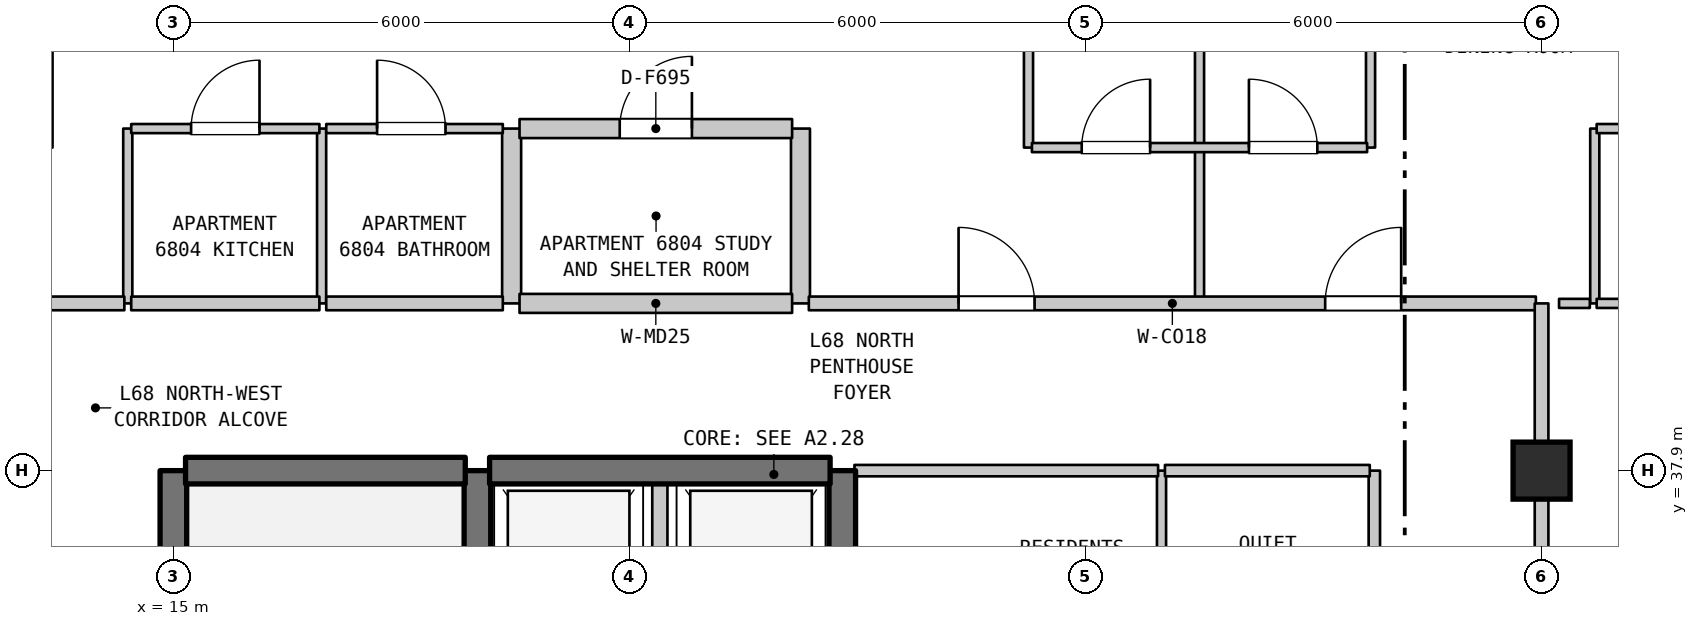
"""IFC4 building model, lengths in metres.
Left out: names, types, materials, properties, quantities, classifications, styles, units other than length and angle.
Written with IfcOpenShell. Run it as: python <this file> out.ifc"""

import sys

from ifc_helpers import new_model, si_unit, direction, frame, frame_2d, origin, origin_2d, place, context, subcontext, project, spatial, rectangle, extrude, element, fill, save


model = new_model("IFC4")
c1 = context("Model", 3, precision=1e-05, world=origin(), true_north=direction((0.0, 1.0)))
c2 = subcontext(c1, "Body", "Model", "MODEL_VIEW")
j1 = project(units=[si_unit("LENGTHUNIT", "METRE"), si_unit("PLANEANGLEUNIT", "RADIAN")], contexts=[c1])
p1 = place(None, origin())
s1 = spatial("IfcSite", under=j1, at=p1, CompositionType="ELEMENT")
p2 = place(p1, origin())
s2 = spatial("IfcBuilding", under=s1, at=p2, CompositionType="ELEMENT")
p3 = place(p2, frame((0.0, 0.0, 273.2)))
s3 = spatial("IfcBuildingStorey", under=s2, at=p3, CompositionType="ELEMENT", Elevation=273.2)
p4 = place(p3, frame((33.0, 37.9, 0.0), z_axis=(0.0, 0.0, 1.0), x_axis=(1.0, 0.0, 0.0)))
e1 = element("IfcColumn", 1, at=p4, inside=s3, PredefinedType="COLUMN", context=c2, shape_type="SweptSolid", body=[
    extrude(rectangle(XDim=0.75, YDim=0.75, at=origin_2d()), origin(), (0.0, 0.0, 1.0), 3.7),
])
p5 = place(p3, frame((13.35, 42.15, 0.0), z_axis=(0.0, 0.0, 1.0), x_axis=(0.0, 1.0, 0.0)))
e2 = element("IfcWall", 2, at=p5, inside=s3, PredefinedType="PARTITIONING", context=c2, shape_type="SweptSolid", body=[
    extrude(rectangle(XDim=7.45, YDim=0.12, at=frame_2d((3.725, 0.0))), origin(), (0.0, 0.0, 1.0), 3.39),
])
p6 = place(p3, frame((14.4, 40.1, 0.0), z_axis=(0.0, 0.0, 1.0), x_axis=(0.0, 1.0, 0.0)))
e3 = element("IfcWall", 3, at=p6, inside=s3, PredefinedType="PARTITIONING", context=c2, shape_type="SweptSolid", body=[
    extrude(rectangle(XDim=2.3, YDim=0.12, at=frame_2d((1.15, 0.0))), origin(), (0.0, 0.0, 1.0), 3.39),
])
p7 = place(p3, frame((15.0, 31.1, 0.0), z_axis=(0.0, 0.0, 1.0), x_axis=(0.0, 1.0, 0.0)))
e4 = element("IfcWall", 4, at=p7, inside=s3, PredefinedType="SHEAR", context=c2, shape_type="SweptSolid", body=[
    extrude(rectangle(XDim=6.8, YDim=0.35, at=frame_2d((3.4, 0.0))), origin(), (0.0, 0.0, 1.0), 3.39),
])
p8 = place(p3, frame((16.95, 40.1, 0.0), z_axis=(0.0, 0.0, 1.0), x_axis=(0.0, 1.0, 0.0)))
e5 = element("IfcWall", 5, at=p8, inside=s3, PredefinedType="PARTITIONING", context=c2, shape_type="SweptSolid", body=[
    extrude(rectangle(XDim=2.3, YDim=0.12, at=frame_2d((1.15, 0.0))), origin(), (0.0, 0.0, 1.0), 3.39),
])
p9 = place(p3, frame((19.0, 35.0, 0.0), z_axis=(0.0, 0.0, 1.0), x_axis=(0.0, 1.0, 0.0)))
e6 = element("IfcWall", 6, at=p9, inside=s3, PredefinedType="SHEAR", context=c2, shape_type="SweptSolid", body=[
    extrude(rectangle(XDim=2.9, YDim=0.35, at=frame_2d((1.45, 0.0))), origin(), (0.0, 0.0, 1.0), 3.39),
])
p10 = place(p3, frame((19.45, 40.1, 0.0), z_axis=(0.0, 0.0, 1.0), x_axis=(0.0, 1.0, 0.0)))
e7 = element("IfcWall", 7, at=p10, inside=s3, PredefinedType="STANDARD", context=c2, shape_type="SweptSolid", body=[
    extrude(rectangle(XDim=2.3, YDim=0.25, at=frame_2d((1.15, 0.0))), origin(), (0.0, 0.0, 1.0), 3.39),
])
p11 = place(p3, frame((21.4, 35.0, 0.0), z_axis=(0.0, 0.0, 1.0), x_axis=(0.0, 1.0, 0.0)))
e8 = element("IfcWall", 8, at=p11, inside=s3, PredefinedType="STANDARD", context=c2, shape_type="SweptSolid", body=[
    extrude(rectangle(XDim=2.9, YDim=0.2, at=frame_2d((1.45, 0.0))), origin(), (0.0, 0.0, 1.0), 3.39),
])
p12 = place(p3, frame((23.25, 40.1, 0.0), z_axis=(0.0, 0.0, 1.0), x_axis=(0.0, 1.0, 0.0)))
e9 = element("IfcWall", 9, at=p12, inside=s3, PredefinedType="STANDARD", context=c2, shape_type="SweptSolid", body=[
    extrude(rectangle(XDim=2.3, YDim=0.25, at=frame_2d((1.15, 0.0))), origin(), (0.0, 0.0, 1.0), 3.39),
])
p13 = place(p3, frame((23.8, 35.0, 0.0), z_axis=(0.0, 0.0, 1.0), x_axis=(0.0, 1.0, 0.0)))
e10 = element("IfcWall", 10, at=p13, inside=s3, PredefinedType="SHEAR", context=c2, shape_type="SweptSolid", body=[
    extrude(rectangle(XDim=2.9, YDim=0.35, at=frame_2d((1.45, 0.0))), origin(), (0.0, 0.0, 1.0), 3.39),
])
p14 = place(p3, frame((26.25, 42.15, 0.0), z_axis=(0.0, 0.0, 1.0), x_axis=(0.0, 1.0, 0.0)))
e11 = element("IfcWall", 11, at=p14, inside=s3, PredefinedType="PARTITIONING", context=c2, shape_type="SweptSolid", body=[
    extrude(rectangle(XDim=11.74, YDim=0.12, at=frame_2d((5.87, 0.0))), origin(), (0.0, 0.0, 1.0), 3.39),
])
p15 = place(p3, frame((28.0, 35.0, 0.0), z_axis=(0.0, 0.0, 1.0), x_axis=(0.0, 1.0, 0.0)))
e12 = element("IfcWall", 12, at=p15, inside=s3, PredefinedType="PARTITIONING", context=c2, shape_type="SweptSolid", body=[
    extrude(rectangle(XDim=2.9, YDim=0.12, at=frame_2d((1.45, 0.0))), origin(), (0.0, 0.0, 1.0), 3.39),
])
p16 = place(p3, frame((28.5, 40.1, 0.0), z_axis=(0.0, 0.0, 1.0), x_axis=(0.0, 1.0, 0.0)))
e13 = element("IfcWall", 13, at=p16, inside=s3, PredefinedType="PARTITIONING", context=c2, shape_type="SweptSolid", body=[
    extrude(rectangle(XDim=2.05, YDim=0.12, at=frame_2d((1.025, 0.0))), origin(), (0.0, 0.0, 1.0), 3.39),
])
for number, where, z_axis, x_axis in (
    (14, (28.5, 42.15, 0.0), (0.0, 0.0, 1.0), (0.0, 1.0, 0.0)),
    (15, (30.75, 42.15, 0.0), (0.0, 0.0, 1.0), (0.0, 1.0, 0.0)),
):
    element("IfcWall", number, at=place(p3, frame(where, z_axis=z_axis, x_axis=x_axis)), inside=s3, PredefinedType="PARTITIONING", context=c2, shape_type="SweptSolid", body=[
        extrude(rectangle(XDim=11.74, YDim=0.12, at=frame_2d((5.87, 0.0))), origin(), (0.0, 0.0, 1.0), 3.39),
    ])
p17 = place(p3, frame((30.8, 35.0, 0.0), z_axis=(0.0, 0.0, 1.0), x_axis=(0.0, 1.0, 0.0)))
e16 = element("IfcWall", 16, at=p17, inside=s3, PredefinedType="STANDARD", context=c2, shape_type="SweptSolid", body=[
    extrude(rectangle(XDim=2.9, YDim=0.15, at=frame_2d((1.45, 0.0))), origin(), (0.0, 0.0, 1.0), 3.39),
])
p18 = place(p3, frame((33.0, 33.75, 0.0), z_axis=(0.0, 0.0, 1.0), x_axis=(0.0, 1.0, 0.0)))
e17 = element("IfcWall", 17, at=p18, inside=s3, PredefinedType="STANDARD", context=c2, shape_type="SweptSolid", body=[
    extrude(rectangle(XDim=4.15, YDim=0.18, at=frame_2d((2.075, 0.0))), origin(), (0.0, 0.0, 1.0), 2.89),
])
p19 = place(p3, frame((33.7, 40.1, 0.0), z_axis=(0.0, 0.0, 1.0), x_axis=(0.0, 1.0, 0.0)))
e18 = element("IfcWall", 18, at=p19, inside=s3, PredefinedType="PARTITIONING", context=c2, shape_type="SweptSolid", body=[
    extrude(rectangle(XDim=2.3, YDim=0.12, at=frame_2d((1.15, 0.0))), origin(), (0.0, 0.0, 1.0), 3.39),
])
p20 = place(p3, frame((15.16, 37.9, 0.0), z_axis=(0.0, 0.0, 1.0), x_axis=(1.0, 0.0, 0.0)))
e19 = element("IfcWall", 19, at=p20, inside=s3, PredefinedType="SHEAR", context=c2, shape_type="SweptSolid", body=[
    extrude(rectangle(XDim=3.68, YDim=0.35, at=frame_2d((1.84, 0.0))), origin(), (0.0, 0.0, 1.0), 3.39),
])
p21 = place(p3, frame((19.16, 37.9, 0.0), z_axis=(0.0, 0.0, 1.0), x_axis=(1.0, 0.0, 0.0)))
e20 = element("IfcWall", 20, at=p21, inside=s3, PredefinedType="SHEAR", context=c2, shape_type="SweptSolid", body=[
    extrude(rectangle(XDim=4.48, YDim=0.35, at=frame_2d((2.24, 0.0))), origin(), (0.0, 0.0, 1.0), 3.39),
])
p22 = place(p3, frame((23.96, 37.9, 0.0), z_axis=(0.0, 0.0, 1.0), x_axis=(1.0, 0.0, 0.0)))
e21 = element("IfcWall", 21, at=p22, inside=s3, PredefinedType="STANDARD", context=c2, shape_type="SweptSolid", body=[
    extrude(rectangle(XDim=3.995, YDim=0.15, at=frame_2d((1.998, 0.0))), origin(), (0.0, 0.0, 1.0), 2.89),
])
p23 = place(p3, frame((28.045, 37.9, 0.0), z_axis=(0.0, 0.0, 1.0), x_axis=(1.0, 0.0, 0.0)))
e22 = element("IfcWall", 22, at=p23, inside=s3, PredefinedType="STANDARD", context=c2, shape_type="SweptSolid", body=[
    extrude(rectangle(XDim=2.695, YDim=0.15, at=frame_2d((1.348, 0.0))), origin(), (0.0, 0.0, 1.0), 2.89),
])
p24 = place(p3, frame((12.975, 40.1, 0.0), z_axis=(0.0, 0.0, 1.0), x_axis=(1.0, 0.0, 0.0)))
e23 = element("IfcWall", 23, at=p24, inside=s3, PredefinedType="STANDARD", context=c2, shape_type="SweptSolid", body=[
    extrude(rectangle(XDim=1.38, YDim=0.18, at=frame_2d((0.69, 0.0))), origin(), (0.0, 0.0, 1.0), 3.39),
])
p25 = place(p3, frame((14.445, 40.1, 0.0), z_axis=(0.0, 0.0, 1.0), x_axis=(1.0, 0.0, 0.0)))
e24 = element("IfcWall", 24, at=p25, inside=s3, PredefinedType="STANDARD", context=c2, shape_type="SweptSolid", body=[
    extrude(rectangle(XDim=2.476, YDim=0.18, at=frame_2d((1.238, 0.0))), origin(), (0.0, 0.0, 1.0), 3.39),
])
p26 = place(p3, frame((17.011, 40.1, 0.0), z_axis=(0.0, 0.0, 1.0), x_axis=(1.0, 0.0, 0.0)))
e25 = element("IfcWall", 25, at=p26, inside=s3, PredefinedType="STANDARD", context=c2, shape_type="SweptSolid", body=[
    extrude(rectangle(XDim=2.323, YDim=0.18, at=frame_2d((1.162, 0.0))), origin(), (0.0, 0.0, 1.0), 3.39),
])
p27 = place(p3, frame((19.554, 40.1, 0.0), z_axis=(0.0, 0.0, 1.0), x_axis=(1.0, 0.0, 0.0)))
e26 = element("IfcWall", 26, at=p27, inside=s3, PredefinedType="STANDARD", context=c2, shape_type="SweptSolid", body=[
    extrude(rectangle(XDim=3.586, YDim=0.25, at=frame_2d((1.793, 0.0))), origin(), (0.0, 0.0, 1.0), 3.39),
])
p28 = place(p3, frame((23.36, 40.1, 0.0), z_axis=(0.0, 0.0, 1.0), x_axis=(1.0, 0.0, 0.0)))
e27 = element("IfcWall", 27, at=p28, inside=s3, PredefinedType="STANDARD", context=c2, shape_type="SweptSolid", body=[
    extrude(rectangle(XDim=9.565, YDim=0.18, at=frame_2d((4.782, 0.0))), origin(), (0.0, 0.0, 1.0), 3.39),
])
p29 = place(p28, frame((1.97, 0.0, 0.0)))
e28 = element("IfcOpeningElement", 28, at=p29, cuts=e27, PredefinedType="OPENING", context=c2, shape_type="SweptSolid", body=[
    extrude(rectangle(XDim=1.0, YDim=2.15, at=frame_2d((0.5, 1.075))), frame((0.0, 0.1, 0.0), z_axis=(0.0, -1.0, 0.0), x_axis=(1.0, 0.0, 0.0)), (0.0, 0.0, 1.0), 0.2),
])
p30 = place(p28, frame((6.793, 0.0, 0.0)))
e29 = element("IfcOpeningElement", 29, at=p30, cuts=e27, PredefinedType="OPENING", context=c2, shape_type="SweptSolid", body=[
    extrude(rectangle(XDim=1.0, YDim=2.15, at=frame_2d((0.5, 1.075))), frame((0.0, 0.1, 0.0), z_axis=(0.0, -1.0, 0.0), x_axis=(1.0, 0.0, 0.0)), (0.0, 0.0, 1.0), 0.2),
])
p31 = place(p3, frame((33.23, 40.1, 0.0), z_axis=(0.0, 0.0, 1.0), x_axis=(1.0, 0.0, 0.0)))
e30 = element("IfcWall", 30, at=p31, inside=s3, PredefinedType="PARTITIONING", context=c2, shape_type="SweptSolid", body=[
    extrude(rectangle(XDim=0.405, YDim=0.12, at=frame_2d((0.203, 0.0))), origin(), (0.0, 0.0, 1.0), 3.39),
])
p32 = place(p3, frame((33.725, 40.1, 0.0), z_axis=(0.0, 0.0, 1.0), x_axis=(1.0, 0.0, 0.0)))
e31 = element("IfcWall", 31, at=p32, inside=s3, PredefinedType="PARTITIONING", context=c2, shape_type="SweptSolid", body=[
    extrude(rectangle(XDim=1.685, YDim=0.12, at=frame_2d((0.842, 0.0))), origin(), (0.0, 0.0, 1.0), 3.39),
])
p33 = place(p3, frame((26.295, 42.15, 0.0), z_axis=(0.0, 0.0, 1.0), x_axis=(1.0, 0.0, 0.0)))
e32 = element("IfcWall", 32, at=p33, inside=s3, PredefinedType="PARTITIONING", context=c2, shape_type="SweptSolid", body=[
    extrude(rectangle(XDim=4.41, YDim=0.12, at=frame_2d((2.205, 0.0))), origin(), (0.0, 0.0, 1.0), 3.39),
])
p34 = place(p33, frame((0.655, 0.0, 0.0)))
e33 = element("IfcOpeningElement", 33, at=p34, cuts=e32, PredefinedType="OPENING", context=c2, shape_type="SweptSolid", body=[
    extrude(rectangle(XDim=0.9, YDim=2.15, at=frame_2d((0.45, 1.075))), frame((0.0, 0.07, 0.0), z_axis=(0.0, -1.0, 0.0), x_axis=(1.0, 0.0, 0.0)), (0.0, 0.0, 1.0), 0.14),
])
p35 = place(p33, frame((2.855, 0.0, 0.0)))
e34 = element("IfcOpeningElement", 34, at=p35, cuts=e32, PredefinedType="OPENING", context=c2, shape_type="SweptSolid", body=[
    extrude(rectangle(XDim=0.9, YDim=2.15, at=frame_2d((0.45, 1.075))), frame((0.0, 0.07, 0.0), z_axis=(0.0, -1.0, 0.0), x_axis=(1.0, 0.0, 0.0)), (0.0, 0.0, 1.0), 0.14),
])
p36 = place(p3, frame((14.445, 42.4, 0.0), z_axis=(0.0, 0.0, 1.0), x_axis=(1.0, 0.0, 0.0)))
e35 = element("IfcWall", 35, at=p36, inside=s3, PredefinedType="PARTITIONING", context=c2, shape_type="SweptSolid", body=[
    extrude(rectangle(XDim=2.476, YDim=0.12, at=frame_2d((1.238, 0.0))), origin(), (0.0, 0.0, 1.0), 3.39),
])
p37 = place(p36, frame((0.788, 0.0, 0.0)))
e36 = element("IfcOpeningElement", 36, at=p37, cuts=e35, PredefinedType="OPENING", context=c2, shape_type="SweptSolid", body=[
    extrude(rectangle(XDim=0.9, YDim=2.15, at=frame_2d((0.45, 1.075))), frame((0.0, 0.07, 0.0), z_axis=(0.0, -1.0, 0.0), x_axis=(1.0, 0.0, 0.0)), (0.0, 0.0, 1.0), 0.14),
])
p38 = place(p3, frame((17.011, 42.4, 0.0), z_axis=(0.0, 0.0, 1.0), x_axis=(1.0, 0.0, 0.0)))
e37 = element("IfcWall", 37, at=p38, inside=s3, PredefinedType="PARTITIONING", context=c2, shape_type="SweptSolid", body=[
    extrude(rectangle(XDim=2.323, YDim=0.12, at=frame_2d((1.162, 0.0))), origin(), (0.0, 0.0, 1.0), 3.39),
])
p39 = place(p38, frame((0.669, 0.0, 0.0)))
e38 = element("IfcOpeningElement", 38, at=p39, cuts=e37, PredefinedType="OPENING", context=c2, shape_type="SweptSolid", body=[
    extrude(rectangle(XDim=0.9, YDim=2.1, at=frame_2d((0.45, 1.05))), frame((0.0, 0.07, 0.0), z_axis=(0.0, -1.0, 0.0), x_axis=(1.0, 0.0, 0.0)), (0.0, 0.0, 1.0), 0.14),
])
p40 = place(p3, frame((19.554, 42.4, 0.0), z_axis=(0.0, 0.0, 1.0), x_axis=(1.0, 0.0, 0.0)))
e39 = element("IfcWall", 39, at=p40, inside=s3, PredefinedType="STANDARD", context=c2, shape_type="SweptSolid", body=[
    extrude(rectangle(XDim=3.586, YDim=0.25, at=frame_2d((1.793, 0.0))), origin(), (0.0, 0.0, 1.0), 3.39),
])
p41 = place(p40, frame((1.318, 0.0, 0.0)))
e40 = element("IfcOpeningElement", 40, at=p41, cuts=e39, PredefinedType="OPENING", context=c2, shape_type="SweptSolid", body=[
    extrude(rectangle(XDim=0.95, YDim=2.15, at=frame_2d((0.475, 1.075))), frame((0.0, 0.135, 0.0), z_axis=(0.0, -1.0, 0.0), x_axis=(1.0, 0.0, 0.0)), (0.0, 0.0, 1.0), 0.27),
])
p42 = place(p3, frame((33.725, 42.4, 0.0), z_axis=(0.0, 0.0, 1.0), x_axis=(1.0, 0.0, 0.0)))
e41 = element("IfcWall", 41, at=p42, inside=s3, PredefinedType="PARTITIONING", context=c2, shape_type="SweptSolid", body=[
    extrude(rectangle(XDim=3.163, YDim=0.12, at=frame_2d((1.582, 0.0))), origin(), (0.0, 0.0, 1.0), 3.39),
])
p43 = place(p42, frame((1.06, 0.0, 0.0)))
e42 = element("IfcOpeningElement", 42, at=p43, cuts=e41, PredefinedType="OPENING", context=c2, shape_type="SweptSolid", body=[
    extrude(rectangle(XDim=0.9, YDim=2.15, at=frame_2d((0.45, 1.075))), frame((0.0, 0.07, 0.0), z_axis=(0.0, -1.0, 0.0), x_axis=(1.0, 0.0, 0.0)), (0.0, 0.0, 1.0), 0.14),
])
p44 = place(p3, frame((33.0, 37.9, 0.0), z_axis=(0.0, 0.0, 1.0), x_axis=(0.0, 1.0, 0.0)))
e43 = element("IfcWall", 43, at=p44, inside=s3, PredefinedType="STANDARD", context=c2, shape_type="SweptSolid", body=[
    extrude(rectangle(XDim=2.2, YDim=0.18, at=frame_2d((1.1, 0.0))), origin(), (0.0, 0.0, 1.0), 2.79),
])
p45 = place(p29, origin())
e44 = element("IfcDoor", 44, at=p45, inside=s3, OperationType="SINGLE_SWING_LEFT", PredefinedType="DOOR", context=c2, shape_type="SweptSolid", body=[
    extrude(rectangle(XDim=1.0, YDim=2.15, at=frame_2d((0.5, 1.075))), frame((0.0, 0.025, 0.0), z_axis=(0.0, -1.0, 0.0), x_axis=(1.0, 0.0, 0.0)), (0.0, 0.0, 1.0), 0.05),
])
fill(e28, e44)
p46 = place(p30, origin())
e45 = element("IfcDoor", 45, at=p46, inside=s3, OperationType="SINGLE_SWING_RIGHT", PredefinedType="DOOR", context=c2, shape_type="SweptSolid", body=[
    extrude(rectangle(XDim=1.0, YDim=2.15, at=frame_2d((0.5, 1.075))), frame((0.0, 0.025, 0.0), z_axis=(0.0, -1.0, 0.0), x_axis=(1.0, 0.0, 0.0)), (0.0, 0.0, 1.0), 0.05),
])
fill(e29, e45)
p47 = place(p34, origin())
e46 = element("IfcDoor", 46, at=p47, inside=s3, OperationType="SINGLE_SWING_RIGHT", PredefinedType="DOOR", context=c2, shape_type="SweptSolid", body=[
    extrude(rectangle(XDim=0.9, YDim=2.15, at=frame_2d((0.45, 1.075))), frame((0.0, 0.025, 0.0), z_axis=(0.0, -1.0, 0.0), x_axis=(1.0, 0.0, 0.0)), (0.0, 0.0, 1.0), 0.05),
])
fill(e33, e46)
p48 = place(p35, origin())
e47 = element("IfcDoor", 47, at=p48, inside=s3, OperationType="SINGLE_SWING_LEFT", PredefinedType="DOOR", context=c2, shape_type="SweptSolid", body=[
    extrude(rectangle(XDim=0.9, YDim=2.15, at=frame_2d((0.45, 1.075))), frame((0.0, 0.025, 0.0), z_axis=(0.0, -1.0, 0.0), x_axis=(1.0, 0.0, 0.0)), (0.0, 0.0, 1.0), 0.05),
])
fill(e34, e47)
p49 = place(p37, origin())
e48 = element("IfcDoor", 48, at=p49, inside=s3, OperationType="SINGLE_SWING_RIGHT", PredefinedType="DOOR", context=c2, shape_type="SweptSolid", body=[
    extrude(rectangle(XDim=0.9, YDim=2.15, at=frame_2d((0.45, 1.075))), frame((0.0, 0.025, 0.0), z_axis=(0.0, -1.0, 0.0), x_axis=(1.0, 0.0, 0.0)), (0.0, 0.0, 1.0), 0.05),
])
fill(e36, e48)
p50 = place(p39, origin())
e49 = element("IfcDoor", 49, at=p50, inside=s3, OperationType="SINGLE_SWING_LEFT", PredefinedType="DOOR", context=c2, shape_type="SweptSolid", body=[
    extrude(rectangle(XDim=0.9, YDim=2.1, at=frame_2d((0.45, 1.05))), frame((0.0, 0.025, 0.0), z_axis=(0.0, -1.0, 0.0), x_axis=(1.0, 0.0, 0.0)), (0.0, 0.0, 1.0), 0.05),
])
fill(e38, e49)
p51 = place(p41, origin())
e50 = element("IfcDoor", 50, at=p51, inside=s3, OperationType="SINGLE_SWING_RIGHT", PredefinedType="DOOR", context=c2, shape_type="SweptSolid", body=[
    extrude(rectangle(XDim=0.95, YDim=2.15, at=frame_2d((0.475, 1.075))), frame((0.0, 0.025, 0.0), z_axis=(0.0, -1.0, 0.0), x_axis=(1.0, 0.0, 0.0)), (0.0, 0.0, 1.0), 0.05),
])
fill(e40, e50)
save(model, sys.argv[1])
